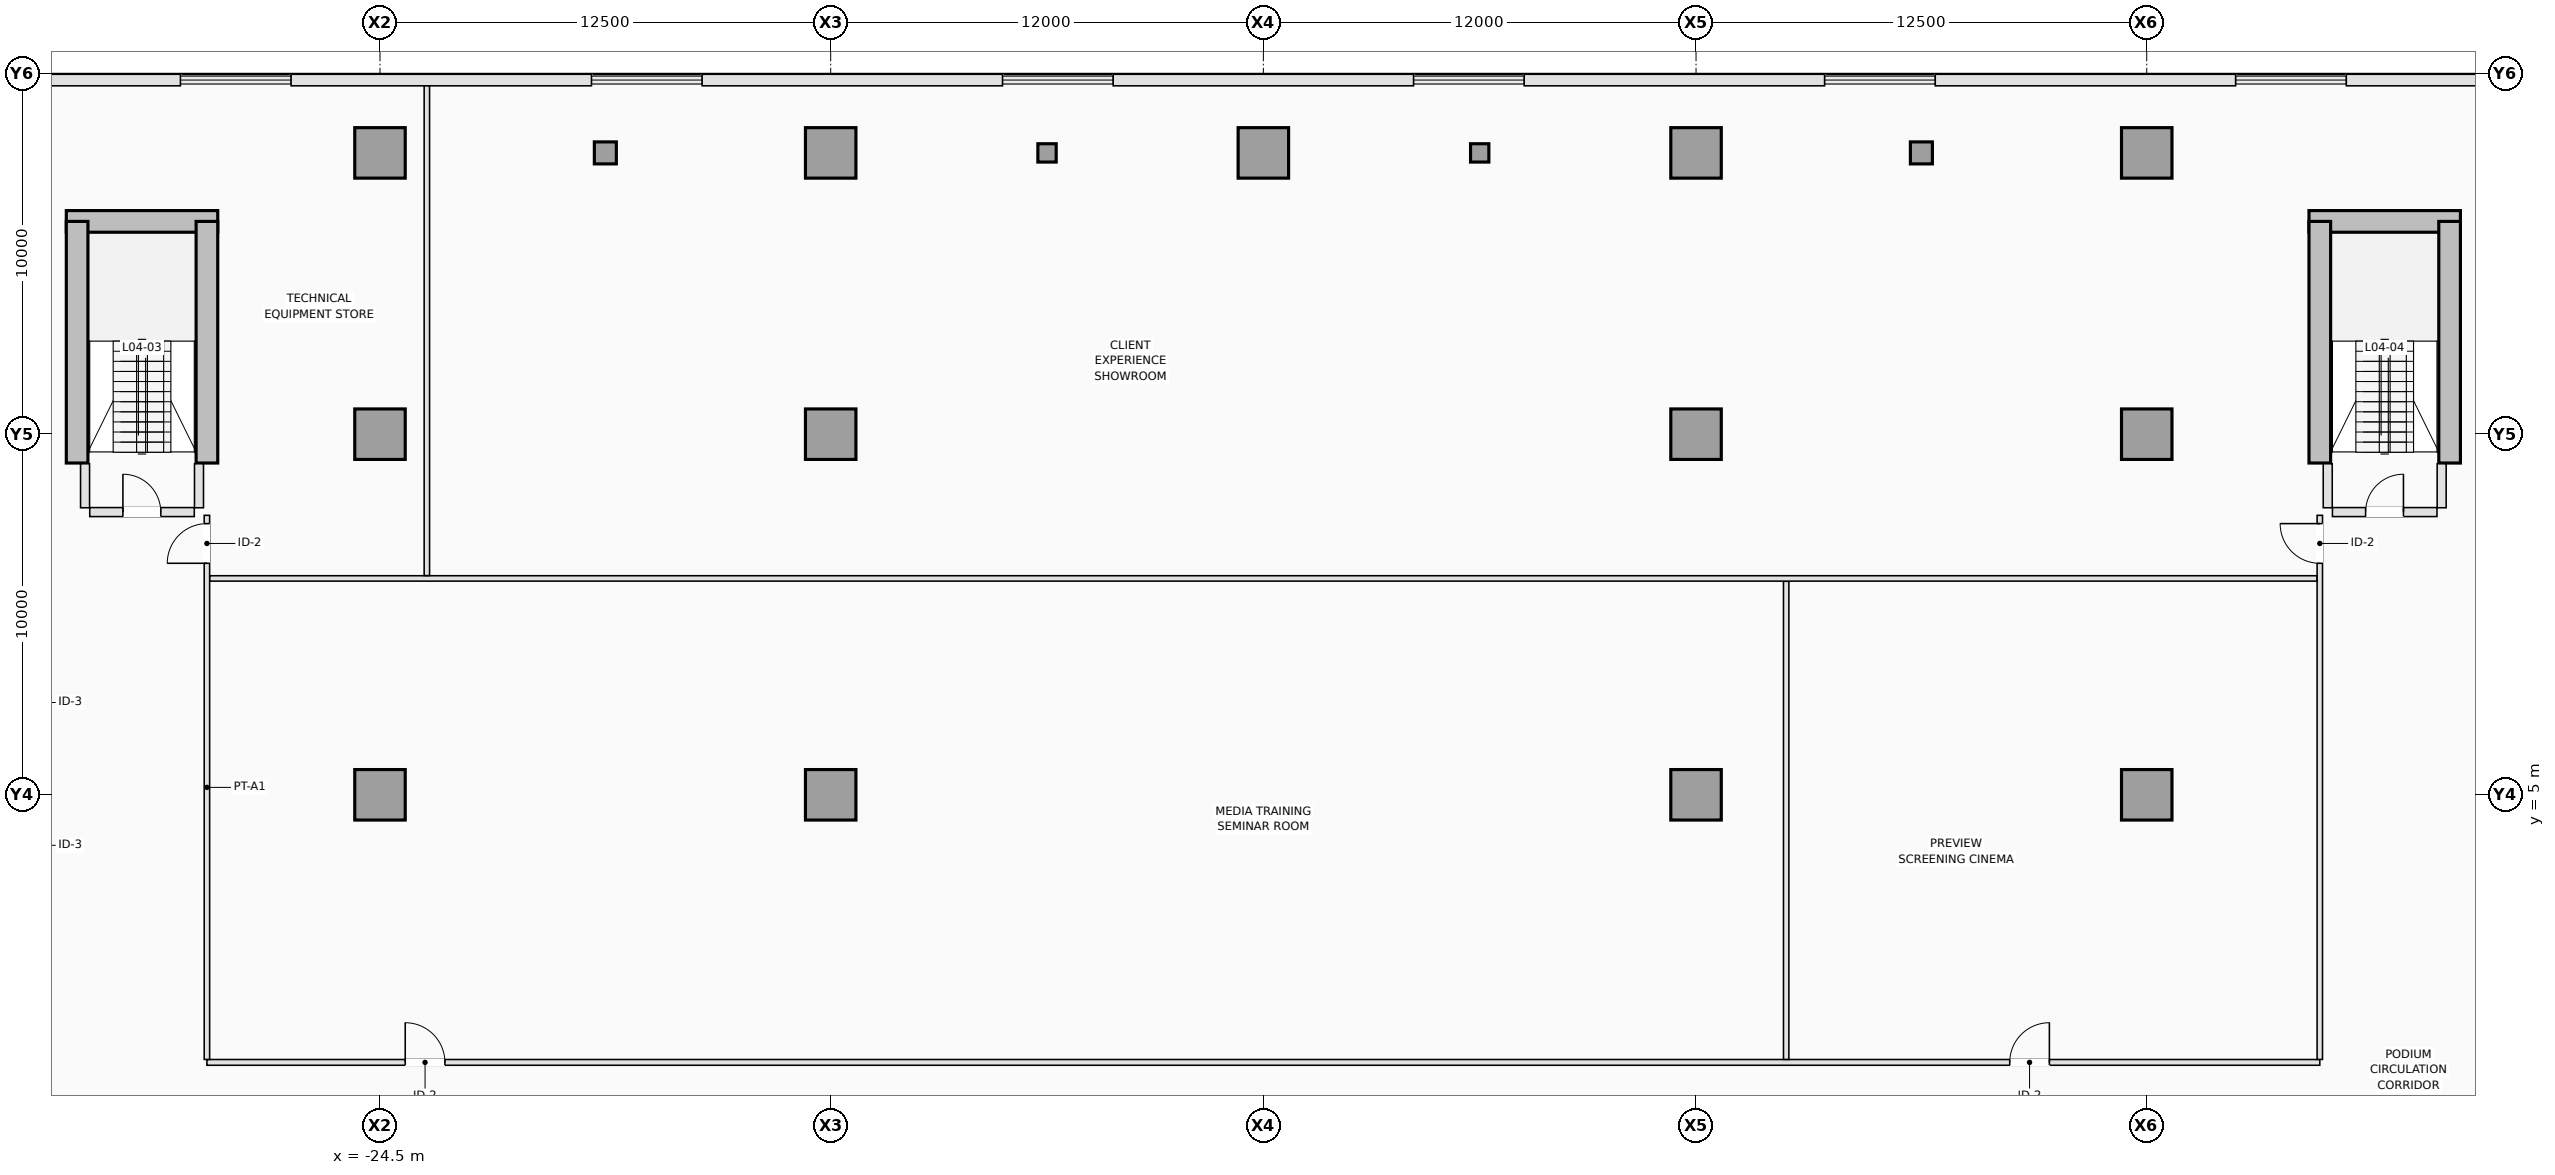
"""IFC4 building model, lengths in metres.
Left out: names, types, materials, properties, quantities, classifications, styles, units other than length and angle.
Written with IfcOpenShell. Run it as: python <this file> out.ifc"""

import sys

from ifc_helpers import new_model, si_unit, direction, frame, frame_2d, origin, origin_2d, place, context, subcontext, project, spatial, rectangle, hollow_circle, extrude, element, fill, save


model = new_model("IFC4")
c1 = context("Model", 3, precision=1e-05, world=origin(), true_north=direction((0.0, 1.0)))
c2 = subcontext(c1, "Body", "Model", "MODEL_VIEW")
j1 = project(units=[si_unit("LENGTHUNIT", "METRE"), si_unit("PLANEANGLEUNIT", "RADIAN")], contexts=[c1])
p1 = place(None, origin())
s1 = spatial("IfcSite", under=j1, at=p1, CompositionType="ELEMENT")
p2 = place(p1, origin())
s2 = spatial("IfcBuilding", under=s1, at=p2, CompositionType="ELEMENT")
p3 = place(p2, frame((0.0, 0.0, 18.5)))
s3 = spatial("IfcBuildingStorey", under=s2, at=p3, CompositionType="ELEMENT", Elevation=18.5)
p4 = place(p3, frame((-33.2, 20.9, 0.0), z_axis=(0.0, 0.0, 1.0), x_axis=(1.0, 0.0, 0.0)))
e1 = element("IfcWall", 1, at=p4, inside=s3, PredefinedType="SHEAR", context=c2, shape_type="SweptSolid", body=[
    extrude(rectangle(XDim=4.2, YDim=0.6, at=frame_2d((2.1, 0.0))), origin(), (0.0, 0.0, 1.0), 4.5),
])
for number, where, z_axis, x_axis in (
    (2, (-32.9, 14.2, 0.0), (0.0, 0.0, 1.0), (0.0, 1.0, 0.0)),
    (3, (-29.3, 14.2, 0.0), (0.0, 0.0, 1.0), (0.0, 1.0, 0.0)),
):
    element("IfcWall", number, at=place(p3, frame(where, z_axis=z_axis, x_axis=x_axis)), inside=s3, PredefinedType="SHEAR", context=c2, shape_type="SweptSolid", body=[
        extrude(rectangle(XDim=6.7, YDim=0.6, at=frame_2d((3.35, 0.0))), origin(), (0.0, 0.0, 1.0), 4.5),
    ])
p5 = place(p3, frame((29.0, 20.9, 0.0), z_axis=(0.0, 0.0, 1.0), x_axis=(1.0, 0.0, 0.0)))
e4 = element("IfcWall", 4, at=p5, inside=s3, PredefinedType="SHEAR", context=c2, shape_type="SweptSolid", body=[
    extrude(rectangle(XDim=4.2, YDim=0.6, at=frame_2d((2.1, 0.0))), origin(), (0.0, 0.0, 1.0), 4.5),
])
for number, where, z_axis, x_axis in (
    (5, (29.3, 14.2, 0.0), (0.0, 0.0, 1.0), (0.0, 1.0, 0.0)),
    (6, (32.9, 14.2, 0.0), (0.0, 0.0, 1.0), (0.0, 1.0, 0.0)),
):
    element("IfcWall", number, at=place(p3, frame(where, z_axis=z_axis, x_axis=x_axis)), inside=s3, PredefinedType="SHEAR", context=c2, shape_type="SweptSolid", body=[
        extrude(rectangle(XDim=6.7, YDim=0.6, at=frame_2d((3.35, 0.0))), origin(), (0.0, 0.0, 1.0), 4.5),
    ])
for number, where, z_axis, x_axis in (
    (7, (-24.5, 5.0, 0.0), (0.0, 0.0, 1.0), (1.0, 0.0, 0.0)),
    (8, (-12.0, 5.0, 0.0), (0.0, 0.0, 1.0), (1.0, 0.0, 0.0)),
    (9, (12.0, 5.0, 0.0), (0.0, 0.0, 1.0), (1.0, 0.0, 0.0)),
    (10, (24.5, 5.0, 0.0), (0.0, 0.0, 1.0), (1.0, 0.0, 0.0)),
    (11, (-24.5, 15.0, 0.0), (0.0, 0.0, 1.0), (1.0, 0.0, 0.0)),
    (12, (-12.0, 15.0, 0.0), (0.0, 0.0, 1.0), (1.0, 0.0, 0.0)),
    (13, (12.0, 15.0, 0.0), (0.0, 0.0, 1.0), (1.0, 0.0, 0.0)),
    (14, (24.5, 15.0, 0.0), (0.0, 0.0, 1.0), (1.0, 0.0, 0.0)),
    (15, (-24.5, 22.8, 0.0), (0.0, 0.0, 1.0), (1.0, 0.0, 0.0)),
    (16, (-12.0, 22.8, 0.0), (0.0, 0.0, 1.0), (1.0, 0.0, 0.0)),
    (17, (0.0, 22.8, 0.0), (0.0, 0.0, 1.0), (1.0, 0.0, 0.0)),
    (18, (12.0, 22.8, 0.0), (0.0, 0.0, 1.0), (1.0, 0.0, 0.0)),
    (19, (24.5, 22.8, 0.0), (0.0, 0.0, 1.0), (1.0, 0.0, 0.0)),
):
    element("IfcColumn", number, at=place(p3, frame(where, z_axis=z_axis, x_axis=x_axis)), inside=s3, PredefinedType="COLUMN", context=c2, shape_type="SweptSolid", body=[
        extrude(rectangle(XDim=1.4, YDim=1.4, at=origin_2d()), origin(), (0.0, 0.0, 1.0), 4.5),
    ])
for number, where, z_axis, x_axis in (
    (20, (-18.25, 22.8, 0.0), (0.0, 0.0, 1.0), (1.0, 0.0, 0.0)),
    (21, (18.25, 22.8, 0.0), (0.0, 0.0, 1.0), (1.0, 0.0, 0.0)),
):
    element("IfcColumn", number, at=place(p3, frame(where, z_axis=z_axis, x_axis=x_axis)), inside=s3, PredefinedType="COLUMN", context=c2, shape_type="SweptSolid", body=[
        extrude(hollow_circle(Radius=0.305, WallThickness=0.025, at=origin_2d()), origin(), (0.0, 0.0, 1.0), 4.5),
    ])
for number, where, z_axis, x_axis in (
    (22, (-6.0, 22.8, 0.0), (0.0, 0.0, 1.0), (1.0, 0.0, 0.0)),
    (23, (6.0, 22.8, 0.0), (0.0, 0.0, 1.0), (1.0, 0.0, 0.0)),
):
    element("IfcColumn", number, at=place(p3, frame(where, z_axis=z_axis, x_axis=x_axis)), inside=s3, PredefinedType="COLUMN", context=c2, shape_type="SweptSolid", body=[
        extrude(hollow_circle(Radius=0.254, WallThickness=0.022, at=origin_2d()), origin(), (0.0, 0.0, 1.0), 4.5),
    ])
p6 = place(p3, frame((-34.9, 24.82, 0.0), z_axis=(0.0, 0.0, 1.0), x_axis=(1.0, 0.0, 0.0)))
e24 = element("IfcWall", 24, at=p6, inside=s3, PredefinedType="STANDARD", context=c2, shape_type="SweptSolid", body=[
    extrude(rectangle(XDim=4.865, YDim=0.32, at=frame_2d((2.433, 0.0))), origin(), (0.0, 0.0, 1.0), 4.08),
])
p7 = place(p3, frame((-26.965, 24.82, 0.0), z_axis=(0.0, 0.0, 1.0), x_axis=(1.0, 0.0, 0.0)))
e25 = element("IfcWall", 25, at=p7, inside=s3, PredefinedType="STANDARD", context=c2, shape_type="SweptSolid", body=[
    extrude(rectangle(XDim=8.33, YDim=0.32, at=frame_2d((4.165, 0.0))), origin(), (0.0, 0.0, 1.0), 4.08),
])
p8 = place(p3, frame((-15.565, 24.82, 0.0), z_axis=(0.0, 0.0, 1.0), x_axis=(1.0, 0.0, 0.0)))
e26 = element("IfcWall", 26, at=p8, inside=s3, PredefinedType="STANDARD", context=c2, shape_type="SweptSolid", body=[
    extrude(rectangle(XDim=8.33, YDim=0.32, at=frame_2d((4.165, 0.0))), origin(), (0.0, 0.0, 1.0), 4.08),
])
p9 = place(p3, frame((-4.165, 24.82, 0.0), z_axis=(0.0, 0.0, 1.0), x_axis=(1.0, 0.0, 0.0)))
e27 = element("IfcWall", 27, at=p9, inside=s3, PredefinedType="STANDARD", context=c2, shape_type="SweptSolid", body=[
    extrude(rectangle(XDim=8.33, YDim=0.32, at=frame_2d((4.165, 0.0))), origin(), (0.0, 0.0, 1.0), 4.08),
])
p10 = place(p3, frame((7.235, 24.82, 0.0), z_axis=(0.0, 0.0, 1.0), x_axis=(1.0, 0.0, 0.0)))
e28 = element("IfcWall", 28, at=p10, inside=s3, PredefinedType="STANDARD", context=c2, shape_type="SweptSolid", body=[
    extrude(rectangle(XDim=8.33, YDim=0.32, at=frame_2d((4.165, 0.0))), origin(), (0.0, 0.0, 1.0), 4.08),
])
p11 = place(p3, frame((18.635, 24.82, 0.0), z_axis=(0.0, 0.0, 1.0), x_axis=(1.0, 0.0, 0.0)))
e29 = element("IfcWall", 29, at=p11, inside=s3, PredefinedType="STANDARD", context=c2, shape_type="SweptSolid", body=[
    extrude(rectangle(XDim=8.33, YDim=0.32, at=frame_2d((4.165, 0.0))), origin(), (0.0, 0.0, 1.0), 4.08),
])
p12 = place(p3, frame((30.035, 24.82, 0.0), z_axis=(0.0, 0.0, 1.0), x_axis=(1.0, 0.0, 0.0)))
e30 = element("IfcWall", 30, at=p12, inside=s3, PredefinedType="STANDARD", context=c2, shape_type="SweptSolid", body=[
    extrude(rectangle(XDim=4.865, YDim=0.32, at=frame_2d((2.433, 0.0))), origin(), (0.0, 0.0, 1.0), 4.08),
])
p13 = place(p3, frame((-32.55, 12.84, 0.0), z_axis=(0.0, 0.0, 1.0), x_axis=(1.0, 0.0, 0.0)))
e31 = element("IfcWall", 31, at=p13, inside=s3, PredefinedType="PARTITIONING", context=c2, shape_type="SweptSolid", body=[
    extrude(rectangle(XDim=2.9, YDim=0.25, at=frame_2d((1.45, 0.0))), origin(), (0.0, 0.0, 1.0), 4.08),
])
p14 = place(p13, frame((0.92, 0.0, 0.0)))
e32 = element("IfcOpeningElement", 32, at=p14, cuts=e31, PredefinedType="OPENING", context=c2, shape_type="SweptSolid", body=[
    extrude(rectangle(XDim=1.05, YDim=2.15, at=frame_2d((0.525, 1.075))), frame((0.0, 0.135, 0.0), z_axis=(0.0, -1.0, 0.0), x_axis=(1.0, 0.0, 0.0)), (0.0, 0.0, 1.0), 0.27),
])
p15 = place(p3, frame((29.65, 12.84, 0.0), z_axis=(0.0, 0.0, 1.0), x_axis=(1.0, 0.0, 0.0)))
e33 = element("IfcWall", 33, at=p15, inside=s3, PredefinedType="PARTITIONING", context=c2, shape_type="SweptSolid", body=[
    extrude(rectangle(XDim=2.9, YDim=0.25, at=frame_2d((1.45, 0.0))), origin(), (0.0, 0.0, 1.0), 4.08),
])
p16 = place(p15, frame((0.92, 0.0, 0.0)))
e34 = element("IfcOpeningElement", 34, at=p16, cuts=e33, PredefinedType="OPENING", context=c2, shape_type="SweptSolid", body=[
    extrude(rectangle(XDim=1.05, YDim=2.15, at=frame_2d((0.525, 1.075))), frame((0.0, 0.135, 0.0), z_axis=(0.0, -1.0, 0.0), x_axis=(1.0, 0.0, 0.0)), (0.0, 0.0, 1.0), 0.27),
])
for number, where, z_axis, x_axis in (
    (35, (-32.68, 12.96, 0.0), (0.0, 0.0, 1.0), (0.0, 1.0, 0.0)),
    (36, (-29.52, 12.96, 0.0), (0.0, 0.0, 1.0), (0.0, 1.0, 0.0)),
    (37, (29.52, 12.96, 0.0), (0.0, 0.0, 1.0), (0.0, 1.0, 0.0)),
    (38, (32.68, 12.96, 0.0), (0.0, 0.0, 1.0), (0.0, 1.0, 0.0)),
):
    element("IfcWall", number, at=place(p3, frame(where, z_axis=z_axis, x_axis=x_axis)), inside=s3, PredefinedType="PARTITIONING", context=c2, shape_type="SweptSolid", body=[
        extrude(rectangle(XDim=1.22, YDim=0.25, at=frame_2d((0.61, 0.0))), origin(), (0.0, 0.0, 1.0), 4.08),
    ])
p17 = place(p3, frame((-29.3, -2.42, 0.0), z_axis=(0.0, 0.0, 1.0), x_axis=(1.0, 0.0, 0.0)))
e39 = element("IfcWall", 39, at=p17, inside=s3, PredefinedType="PARTITIONING", context=c2, shape_type="SweptSolid", body=[
    extrude(rectangle(XDim=58.6, YDim=0.16, at=frame_2d((29.3, 0.0))), origin(), (0.0, 0.0, 1.0), 4.08),
])
p18 = place(p17, frame((5.5, 0.0, 0.0)))
e40 = element("IfcOpeningElement", 40, at=p18, cuts=e39, PredefinedType="OPENING", context=c2, shape_type="SweptSolid", body=[
    extrude(rectangle(XDim=1.1, YDim=2.15, at=frame_2d((0.55, 1.075))), frame((0.0, 0.09, 0.0), z_axis=(0.0, -1.0, 0.0), x_axis=(1.0, 0.0, 0.0)), (0.0, 0.0, 1.0), 0.18),
])
p19 = place(p17, frame((50.0, 0.0, 0.0)))
e41 = element("IfcOpeningElement", 41, at=p19, cuts=e39, PredefinedType="OPENING", context=c2, shape_type="SweptSolid", body=[
    extrude(rectangle(XDim=1.1, YDim=2.15, at=frame_2d((0.55, 1.075))), frame((0.0, 0.09, 0.0), z_axis=(0.0, -1.0, 0.0), x_axis=(1.0, 0.0, 0.0)), (0.0, 0.0, 1.0), 0.18),
])
p20 = place(p3, frame((-29.3, -2.338, 0.0), z_axis=(0.0, 0.0, 1.0), x_axis=(0.0, 1.0, 0.0)))
e42 = element("IfcWall", 42, at=p20, inside=s3, PredefinedType="PARTITIONING", context=c2, shape_type="SweptSolid", body=[
    extrude(rectangle(XDim=15.088, YDim=0.15, at=frame_2d((7.544, 0.0))), origin(), (0.0, 0.0, 1.0), 4.08),
])
p21 = place(p20, frame((13.758, 0.0, 0.0)))
e43 = element("IfcOpeningElement", 43, at=p21, cuts=e42, PredefinedType="OPENING", context=c2, shape_type="SweptSolid", body=[
    extrude(rectangle(XDim=1.1, YDim=2.15, at=frame_2d((0.55, 1.075))), frame((0.0, 0.085, 0.0), z_axis=(0.0, -1.0, 0.0), x_axis=(1.0, 0.0, 0.0)), (0.0, 0.0, 1.0), 0.17),
])
p22 = place(p3, frame((29.3, -2.338, 0.0), z_axis=(0.0, 0.0, 1.0), x_axis=(0.0, 1.0, 0.0)))
e44 = element("IfcWall", 44, at=p22, inside=s3, PredefinedType="PARTITIONING", context=c2, shape_type="SweptSolid", body=[
    extrude(rectangle(XDim=15.088, YDim=0.15, at=frame_2d((7.544, 0.0))), origin(), (0.0, 0.0, 1.0), 4.08),
])
p23 = place(p22, frame((13.758, 0.0, 0.0)))
e45 = element("IfcOpeningElement", 45, at=p23, cuts=e44, PredefinedType="OPENING", context=c2, shape_type="SweptSolid", body=[
    extrude(rectangle(XDim=1.1, YDim=2.15, at=frame_2d((0.55, 1.075))), frame((0.0, 0.085, 0.0), z_axis=(0.0, -1.0, 0.0), x_axis=(1.0, 0.0, 0.0)), (0.0, 0.0, 1.0), 0.17),
])
p24 = place(p3, frame((14.5, -2.338, 0.0), z_axis=(0.0, 0.0, 1.0), x_axis=(0.0, 1.0, 0.0)))
e46 = element("IfcWall", 46, at=p24, inside=s3, PredefinedType="PARTITIONING", context=c2, shape_type="SweptSolid", body=[
    extrude(rectangle(XDim=13.258, YDim=0.15, at=frame_2d((6.629, 0.0))), origin(), (0.0, 0.0, 1.0), 4.08),
])
p25 = place(p3, frame((-29.22, 11.0, 0.0), z_axis=(0.0, 0.0, 1.0), x_axis=(1.0, 0.0, 0.0)))
e47 = element("IfcWall", 47, at=p25, inside=s3, PredefinedType="PARTITIONING", context=c2, shape_type="SweptSolid", body=[
    extrude(rectangle(XDim=58.44, YDim=0.15, at=frame_2d((29.22, 0.0))), origin(), (0.0, 0.0, 1.0), 4.08),
])
p26 = place(p3, frame((-23.2, 11.08, 0.0), z_axis=(0.0, 0.0, 1.0), x_axis=(0.0, 1.0, 0.0)))
e48 = element("IfcWall", 48, at=p26, inside=s3, PredefinedType="PARTITIONING", context=c2, shape_type="SweptSolid", body=[
    extrude(rectangle(XDim=13.578, YDim=0.15, at=frame_2d((6.789, 0.0))), origin(), (0.0, 0.0, 1.0), 4.08),
])
p27 = place(p14, origin())
e49 = element("IfcDoor", 49, at=p27, inside=s3, OperationType="SINGLE_SWING_LEFT", PredefinedType="DOOR", context=c2, shape_type="SweptSolid", body=[
    extrude(rectangle(XDim=1.05, YDim=2.15, at=frame_2d((0.525, 1.075))), frame((0.0, 0.025, 0.0), z_axis=(0.0, -1.0, 0.0), x_axis=(1.0, 0.0, 0.0)), (0.0, 0.0, 1.0), 0.05),
])
fill(e32, e49)
p28 = place(p16, origin())
e50 = element("IfcDoor", 50, at=p28, inside=s3, OperationType="SINGLE_SWING_RIGHT", PredefinedType="DOOR", context=c2, shape_type="SweptSolid", body=[
    extrude(rectangle(XDim=1.05, YDim=2.15, at=frame_2d((0.525, 1.075))), frame((0.0, 0.025, 0.0), z_axis=(0.0, -1.0, 0.0), x_axis=(1.0, 0.0, 0.0)), (0.0, 0.0, 1.0), 0.05),
])
fill(e34, e50)
p29 = place(p18, origin())
e51 = element("IfcDoor", 51, at=p29, inside=s3, OperationType="SINGLE_SWING_LEFT", PredefinedType="DOOR", context=c2, shape_type="SweptSolid", body=[
    extrude(rectangle(XDim=1.1, YDim=2.15, at=frame_2d((0.55, 1.075))), frame((0.0, 0.025, 0.0), z_axis=(0.0, -1.0, 0.0), x_axis=(1.0, 0.0, 0.0)), (0.0, 0.0, 1.0), 0.05),
])
fill(e40, e51)
p30 = place(p19, origin())
e52 = element("IfcDoor", 52, at=p30, inside=s3, OperationType="SINGLE_SWING_RIGHT", PredefinedType="DOOR", context=c2, shape_type="SweptSolid", body=[
    extrude(rectangle(XDim=1.1, YDim=2.15, at=frame_2d((0.55, 1.075))), frame((0.0, 0.025, 0.0), z_axis=(0.0, -1.0, 0.0), x_axis=(1.0, 0.0, 0.0)), (0.0, 0.0, 1.0), 0.05),
])
fill(e41, e52)
p31 = place(p21, origin())
e53 = element("IfcDoor", 53, at=p31, inside=s3, OperationType="SINGLE_SWING_LEFT", PredefinedType="DOOR", context=c2, shape_type="SweptSolid", body=[
    extrude(rectangle(XDim=1.1, YDim=2.15, at=frame_2d((0.55, 1.075))), frame((0.0, 0.025, 0.0), z_axis=(0.0, -1.0, 0.0), x_axis=(1.0, 0.0, 0.0)), (0.0, 0.0, 1.0), 0.05),
])
fill(e43, e53)
p32 = place(p23, origin())
e54 = element("IfcDoor", 54, at=p32, inside=s3, OperationType="SINGLE_SWING_RIGHT", PredefinedType="DOOR", context=c2, shape_type="SweptSolid", body=[
    extrude(rectangle(XDim=1.1, YDim=2.15, at=frame_2d((0.55, 1.075))), frame((0.0, 0.025, 0.0), z_axis=(0.0, -1.0, 0.0), x_axis=(1.0, 0.0, 0.0)), (0.0, 0.0, 1.0), 0.05),
])
fill(e45, e54)
save(model, sys.argv[1])
